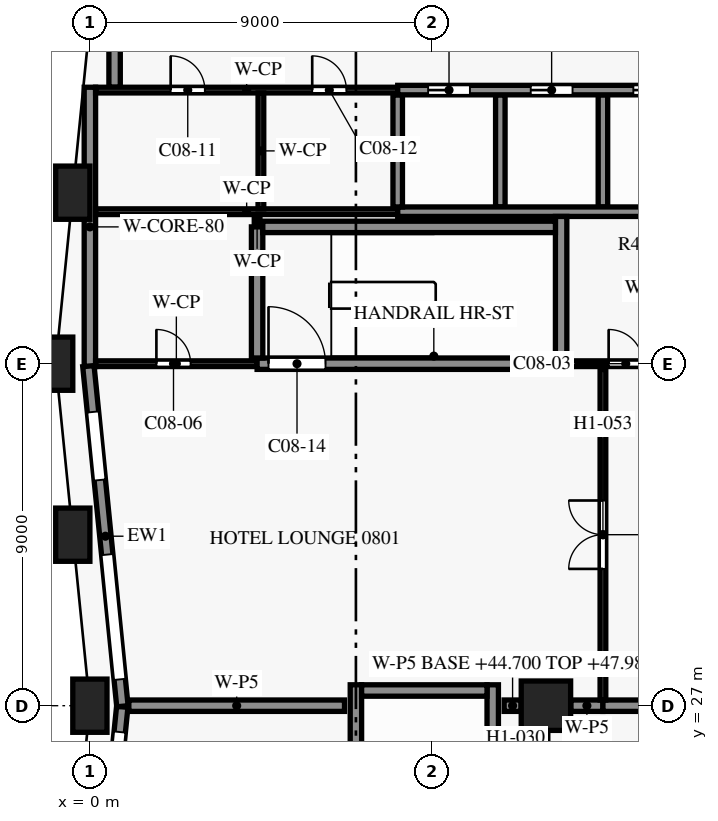
"""IFC4 building model, lengths in metres.
Left out: names, types, materials, properties, quantities, classifications, styles, units other than length and angle.
Written with IfcOpenShell. Run it as: python <this file> out.ifc"""

import sys

from ifc_helpers import new_model, si_unit, direction, frame, frame_2d, origin, origin_2d, place, context, subcontext, project, spatial, rectangle, extrude, element, fill, save


model = new_model("IFC4")
c1 = context("Model", 3, precision=1e-05, world=origin(), true_north=direction((0.0, 1.0)))
c2 = subcontext(c1, "Body", "Model", "MODEL_VIEW")
j1 = project(units=[si_unit("LENGTHUNIT", "METRE"), si_unit("PLANEANGLEUNIT", "RADIAN")], contexts=[c1])
p1 = place(None, origin())
s1 = spatial("IfcSite", under=j1, at=p1, CompositionType="ELEMENT")
p2 = place(p1, origin())
s2 = spatial("IfcBuilding", under=s1, at=p2, CompositionType="ELEMENT")
p3 = place(p2, frame((0.0, 0.0, 44.7)))
s3 = spatial("IfcBuildingStorey", under=s2, at=p3, CompositionType="ELEMENT", Elevation=44.7)
for number, where, z_axis, x_axis in (
    (1, (-0.45, 40.5, 0.0), (0.0, 0.0, 1.0), (-0.1, -0.995, 0.0)),
    (2, (-0.9, 36.0, 0.0), (0.0, 0.0, 1.0), (0.0, -1.0, 0.0)),
    (3, (-0.45, 31.5, 0.0), (0.0, 0.0, 1.0), (0.1, -0.995, 0.0)),
    (4, (0.0, 27.0, 0.0), (0.0, 0.0, 1.0), (0.0, -1.0, 0.0)),
):
    element("IfcColumn", number, at=place(p3, frame(where, z_axis=z_axis, x_axis=x_axis)), inside=s3, PredefinedType="COLUMN", context=c2, shape_type="SweptSolid", body=[
        extrude(rectangle(XDim=0.9, YDim=1.4, at=origin_2d()), origin(), (0.0, 0.0, 1.0), 3.6),
    ])
p4 = place(p3, frame((12.0, 27.0, 0.0), z_axis=(0.0, 0.0, 1.0), x_axis=(1.0, 0.0, 0.0)))
e5 = element("IfcColumn", 5, at=p4, inside=s3, PredefinedType="COLUMN", context=c2, shape_type="SweptSolid", body=[
    extrude(rectangle(XDim=1.3, YDim=1.3, at=origin_2d()), origin(), (0.0, 0.0, 1.0), 3.6),
])
p5 = place(p3, frame((0.856, 26.985, 0.0), z_axis=(0.0, 0.0, 1.0), x_axis=(-0.099503719021, 0.99503719021, 0.0)))
e6 = element("IfcWall", 6, at=p5, inside=s3, PredefinedType="SOLIDWALL", context=c2, shape_type="SweptSolid", body=[
    extrude(rectangle(XDim=8.995, YDim=0.3, at=frame_2d((4.498, 0.0))), origin(), (0.0, 0.0, 1.0), 2.95),
])
p6 = place(p5, frame((0.711, 0.0, 0.15)))
e7 = element("IfcOpeningElement", 7, at=p6, cuts=e6, PredefinedType="OPENING", context=c2, shape_type="SweptSolid", body=[
    extrude(rectangle(XDim=3.3, YDim=2.4, at=frame_2d((1.65, 1.2))), frame((0.0, 0.16, 0.0), z_axis=(0.0, -1.0, 0.0), x_axis=(1.0, 0.0, 0.0)), (0.0, 0.0, 1.0), 0.32),
])
p7 = place(p5, frame((5.984, 0.0, 0.75)))
e8 = element("IfcOpeningElement", 8, at=p7, cuts=e6, PredefinedType="OPENING", context=c2, shape_type="SweptSolid", body=[
    extrude(rectangle(XDim=1.8, YDim=1.8, at=frame_2d((0.9, 0.9))), frame((0.0, 0.16, 0.0), z_axis=(0.0, -1.0, 0.0), x_axis=(1.0, 0.0, 0.0)), (0.0, 0.0, 1.0), 0.32),
])
p8 = place(p3, frame((-0.047, 17.985, 0.0), z_axis=(0.0, 0.0, 1.0), x_axis=(0.099522457379, 0.995035316196, 0.0)))
e9 = element("IfcWall", 9, at=p8, inside=s3, PredefinedType="SOLIDWALL", context=c2, shape_type="SweptSolid", body=[
    extrude(rectangle(XDim=9.03, YDim=0.3, at=frame_2d((4.515, 0.0))), origin(), (0.0, 0.0, 1.0), 2.95),
])
p9 = place(p8, frame((1.291, 0.0, 0.75)))
e10 = element("IfcOpeningElement", 10, at=p9, cuts=e9, PredefinedType="OPENING", context=c2, shape_type="SweptSolid", body=[
    extrude(rectangle(XDim=1.8, YDim=1.8, at=frame_2d((0.9, 0.9))), frame((0.0, 0.16, 0.0), z_axis=(0.0, -1.0, 0.0), x_axis=(1.0, 0.0, 0.0)), (0.0, 0.0, 1.0), 0.32),
])
p10 = place(p8, frame((5.064, 0.0, 0.15)))
e11 = element("IfcOpeningElement", 11, at=p10, cuts=e9, PredefinedType="OPENING", context=c2, shape_type="SweptSolid", body=[
    extrude(rectangle(XDim=3.3, YDim=2.4, at=frame_2d((1.65, 1.2))), frame((0.0, 0.16, 0.0), z_axis=(0.0, -1.0, 0.0), x_axis=(1.0, 0.0, 0.0)), (0.0, 0.0, 1.0), 0.32),
])
p11 = place(p3, frame((7.15, 27.4, 0.0), z_axis=(0.0, 0.0, 1.0), x_axis=(1.0, 0.0, 0.0)))
e12 = element("IfcWall", 12, at=p11, inside=s3, PredefinedType="SHEAR", context=c2, shape_type="SweptSolid", body=[
    extrude(rectangle(XDim=3.3, YDim=0.3, at=frame_2d((1.65, 0.0))), origin(), (0.0, 0.0, 1.0), 3.3),
])
p12 = place(p3, frame((0.15, 36.0, 0.0), z_axis=(0.0, 0.0, 1.0), x_axis=(1.0, 0.0, 0.0)))
e13 = element("IfcWall", 13, at=p12, inside=s3, PredefinedType="PARTITIONING", context=c2, shape_type="SweptSolid", body=[
    extrude(rectangle(XDim=4.25, YDim=0.15, at=frame_2d((2.125, 0.0))), origin(), (0.0, 0.0, 1.0), 3.3),
])
p13 = place(p12, frame((1.6, 0.0, 0.0)))
e14 = element("IfcOpeningElement", 14, at=p13, cuts=e13, PredefinedType="OPENING", context=c2, shape_type="SweptSolid", body=[
    extrude(rectangle(XDim=0.9, YDim=2.1, at=frame_2d((0.45, 1.05))), frame((0.0, 0.085, 0.0), z_axis=(0.0, -1.0, 0.0), x_axis=(1.0, 0.0, 0.0)), (0.0, 0.0, 1.0), 0.17),
])
p14 = place(p3, frame((12.4, 36.0, 0.0), z_axis=(0.0, 0.0, 1.0), x_axis=(1.0, 0.0, 0.0)))
e15 = element("IfcWall", 15, at=p14, inside=s3, PredefinedType="SHEAR", context=c2, shape_type="SweptSolid", body=[
    extrude(rectangle(XDim=11.825, YDim=0.15, at=frame_2d((5.913, 0.0))), origin(), (0.0, 0.0, 1.0), 3.3),
])
p15 = place(p14, frame((1.25, 0.0, 0.0)))
e16 = element("IfcOpeningElement", 16, at=p15, cuts=e15, PredefinedType="OPENING", context=c2, shape_type="SweptSolid", body=[
    extrude(rectangle(XDim=0.9, YDim=2.1, at=frame_2d((0.45, 1.05))), frame((0.0, 0.085, 0.0), z_axis=(0.0, -1.0, 0.0), x_axis=(1.0, 0.0, 0.0)), (0.0, 0.0, 1.0), 0.17),
])
p16 = place(p14, frame((5.2, 0.0, 0.0)))
e17 = element("IfcOpeningElement", 17, at=p16, cuts=e15, PredefinedType="OPENING", context=c2, shape_type="SweptSolid", body=[
    extrude(rectangle(XDim=0.9, YDim=2.1, at=frame_2d((0.45, 1.05))), frame((0.0, 0.085, 0.0), z_axis=(0.0, -1.0, 0.0), x_axis=(1.0, 0.0, 0.0)), (0.0, 0.0, 1.0), 0.17),
])
p17 = place(p14, frame((9.425, 0.0, 0.0)))
e18 = element("IfcOpeningElement", 18, at=p17, cuts=e15, PredefinedType="OPENING", context=c2, shape_type="SweptSolid", body=[
    extrude(rectangle(XDim=0.95, YDim=2.1, at=frame_2d((0.475, 1.05))), frame((0.0, 0.085, 0.0), z_axis=(0.0, -1.0, 0.0), x_axis=(1.0, 0.0, 0.0)), (0.0, 0.0, 1.0), 0.17),
])
p18 = place(p3, frame((4.4, 36.0, 0.0), z_axis=(0.0, 0.0, 1.0), x_axis=(1.0, 0.0, 0.0)))
e19 = element("IfcWall", 19, at=p18, inside=s3, PredefinedType="SHEAR", context=c2, shape_type="SweptSolid", body=[
    extrude(rectangle(XDim=8.0, YDim=0.3, at=frame_2d((4.0, 0.0))), origin(), (0.0, 0.0, 1.0), 3.3),
])
p19 = place(p18, frame((0.3, 0.0, 0.0)))
e20 = element("IfcOpeningElement", 20, at=p19, cuts=e19, PredefinedType="OPENING", context=c2, shape_type="SweptSolid", body=[
    extrude(rectangle(XDim=1.5, YDim=2.2, at=frame_2d((0.75, 1.1))), frame((0.0, 0.16, 0.0), z_axis=(0.0, -1.0, 0.0), x_axis=(1.0, 0.0, 0.0)), (0.0, 0.0, 1.0), 0.32),
])
p20 = place(p3, frame((4.55, 39.6, 0.0), z_axis=(0.0, 0.0, 1.0), x_axis=(1.0, 0.0, 0.0)))
e21 = element("IfcWall", 21, at=p20, inside=s3, PredefinedType="SHEAR", context=c2, shape_type="SweptSolid", body=[
    extrude(rectangle(XDim=7.7, YDim=0.3, at=frame_2d((3.85, 0.0))), origin(), (0.0, 0.0, 1.0), 3.3),
])
p21 = place(p3, frame((0.15, 40.0, 0.0), z_axis=(0.0, 0.0, 1.0), x_axis=(1.0, 0.0, 0.0)))
e22 = element("IfcWall", 22, at=p21, inside=s3, PredefinedType="PARTITIONING", context=c2, shape_type="SweptSolid", body=[
    extrude(rectangle(XDim=7.95, YDim=0.15, at=frame_2d((3.975, 0.0))), origin(), (0.0, 0.0, 1.0), 3.3),
])
p22 = place(p3, frame((8.1, 40.0, 0.0), z_axis=(0.0, 0.0, 1.0), x_axis=(1.0, 0.0, 0.0)))
e23 = element("IfcWall", 23, at=p22, inside=s3, PredefinedType="SHEAR", context=c2, shape_type="SweptSolid", body=[
    extrude(rectangle(XDim=16.075, YDim=0.25, at=frame_2d((8.038, 0.0))), origin(), (0.0, 0.0, 1.0), 3.3),
])
p23 = place(p3, frame((0.15, 43.2, 0.0), z_axis=(0.0, 0.0, 1.0), x_axis=(1.0, 0.0, 0.0)))
e24 = element("IfcWall", 24, at=p23, inside=s3, PredefinedType="PARTITIONING", context=c2, shape_type="SweptSolid", body=[
    extrude(rectangle(XDim=7.95, YDim=0.15, at=frame_2d((3.975, 0.0))), origin(), (0.0, 0.0, 1.0), 3.3),
])
p24 = place(p23, frame((1.975, 0.0, 0.0)))
e25 = element("IfcOpeningElement", 25, at=p24, cuts=e24, PredefinedType="OPENING", context=c2, shape_type="SweptSolid", body=[
    extrude(rectangle(XDim=0.9, YDim=2.1, at=frame_2d((0.45, 1.05))), frame((0.0, 0.085, 0.0), z_axis=(0.0, -1.0, 0.0), x_axis=(1.0, 0.0, 0.0)), (0.0, 0.0, 1.0), 0.17),
])
p25 = place(p23, frame((5.7, 0.0, 0.0)))
e26 = element("IfcOpeningElement", 26, at=p25, cuts=e24, PredefinedType="OPENING", context=c2, shape_type="SweptSolid", body=[
    extrude(rectangle(XDim=0.9, YDim=2.1, at=frame_2d((0.45, 1.05))), frame((0.0, 0.085, 0.0), z_axis=(0.0, -1.0, 0.0), x_axis=(1.0, 0.0, 0.0)), (0.0, 0.0, 1.0), 0.17),
])
p26 = place(p3, frame((8.1, 43.2, 0.0), z_axis=(0.0, 0.0, 1.0), x_axis=(1.0, 0.0, 0.0)))
e27 = element("IfcWall", 27, at=p26, inside=s3, PredefinedType="SHEAR", context=c2, shape_type="SweptSolid", body=[
    extrude(rectangle(XDim=16.075, YDim=0.25, at=frame_2d((8.038, 0.0))), origin(), (0.0, 0.0, 1.0), 3.3),
])
p27 = place(p26, frame((14.3, 0.0, 0.0)))
e28 = element("IfcOpeningElement", 28, at=p27, cuts=e27, PredefinedType="OPENING", context=c2, shape_type="SweptSolid", body=[
    extrude(rectangle(XDim=1.1, YDim=2.1, at=frame_2d((0.55, 1.05))), frame((0.0, 0.135, 0.0), z_axis=(0.0, -1.0, 0.0), x_axis=(1.0, 0.0, 0.0)), (0.0, 0.0, 1.0), 0.27),
])
p28 = place(p26, frame((0.8, 0.0, 0.0)))
e29 = element("IfcOpeningElement", 29, at=p28, cuts=e27, PredefinedType="OPENING", context=c2, shape_type="SweptSolid", body=[
    extrude(rectangle(XDim=1.1, YDim=2.1, at=frame_2d((0.55, 1.05))), frame((0.0, 0.135, 0.0), z_axis=(0.0, -1.0, 0.0), x_axis=(1.0, 0.0, 0.0)), (0.0, 0.0, 1.0), 0.27),
])
p29 = place(p26, frame((3.5, 0.0, 0.0)))
e30 = element("IfcOpeningElement", 30, at=p29, cuts=e27, PredefinedType="OPENING", context=c2, shape_type="SweptSolid", body=[
    extrude(rectangle(XDim=1.1, YDim=2.1, at=frame_2d((0.55, 1.05))), frame((0.0, 0.135, 0.0), z_axis=(0.0, -1.0, 0.0), x_axis=(1.0, 0.0, 0.0)), (0.0, 0.0, 1.0), 0.27),
])
p30 = place(p26, frame((6.2, 0.0, 0.0)))
e31 = element("IfcOpeningElement", 31, at=p30, cuts=e27, PredefinedType="OPENING", context=c2, shape_type="SweptSolid", body=[
    extrude(rectangle(XDim=1.1, YDim=2.1, at=frame_2d((0.55, 1.05))), frame((0.0, 0.135, 0.0), z_axis=(0.0, -1.0, 0.0), x_axis=(1.0, 0.0, 0.0)), (0.0, 0.0, 1.0), 0.27),
])
p31 = place(p26, frame((8.9, 0.0, 0.0)))
e32 = element("IfcOpeningElement", 32, at=p31, cuts=e27, PredefinedType="OPENING", context=c2, shape_type="SweptSolid", body=[
    extrude(rectangle(XDim=1.1, YDim=2.1, at=frame_2d((0.55, 1.05))), frame((0.0, 0.135, 0.0), z_axis=(0.0, -1.0, 0.0), x_axis=(1.0, 0.0, 0.0)), (0.0, 0.0, 1.0), 0.27),
])
p32 = place(p26, frame((11.6, 0.0, 0.0)))
e33 = element("IfcOpeningElement", 33, at=p32, cuts=e27, PredefinedType="OPENING", context=c2, shape_type="SweptSolid", body=[
    extrude(rectangle(XDim=1.1, YDim=2.1, at=frame_2d((0.55, 1.05))), frame((0.0, 0.135, 0.0), z_axis=(0.0, -1.0, 0.0), x_axis=(1.0, 0.0, 0.0)), (0.0, 0.0, 1.0), 0.27),
])
p33 = place(p3, frame((0.0, 35.925, 0.0), z_axis=(0.0, 0.0, 1.0), x_axis=(0.0, 1.0, 0.0)))
e34 = element("IfcWall", 34, at=p33, inside=s3, PredefinedType="SHEAR", context=c2, shape_type="SweptSolid", body=[
    extrude(rectangle(XDim=7.35, YDim=0.3, at=frame_2d((3.675, 0.0))), origin(), (0.0, 0.0, 1.0), 3.3),
])
p34 = place(p3, frame((0.65, 43.275, 0.0), z_axis=(0.0, 0.0, 1.0), x_axis=(0.0, 1.0, 0.0)))
e35 = element("IfcWall", 35, at=p34, inside=s3, PredefinedType="SHEAR", context=c2, shape_type="SweptSolid", body=[
    extrude(rectangle(XDim=3.65, YDim=0.3, at=frame_2d((1.825, 0.0))), origin(), (0.0, 0.0, 1.0), 3.3),
])
p35 = place(p3, frame((4.4, 39.6, 0.0), z_axis=(0.0, 0.0, 1.0), x_axis=(0.0, 1.0, 0.0)))
e36 = element("IfcWall", 36, at=p35, inside=s3, PredefinedType="PARTITIONING", context=c2, shape_type="SweptSolid", body=[
    extrude(rectangle(XDim=0.325, YDim=0.15, at=frame_2d((0.163, 0.0))), origin(), (0.0, 0.0, 1.0), 3.3),
])
p36 = place(p3, frame((4.4, 36.15, 0.0), z_axis=(0.0, 0.0, 1.0), x_axis=(0.0, 1.0, 0.0)))
e37 = element("IfcWall", 37, at=p36, inside=s3, PredefinedType="SHEAR", context=c2, shape_type="SweptSolid", body=[
    extrude(rectangle(XDim=3.45, YDim=0.3, at=frame_2d((1.725, 0.0))), origin(), (0.0, 0.0, 1.0), 3.3),
])
p37 = place(p3, frame((4.5, 40.075, 0.0), z_axis=(0.0, 0.0, 1.0), x_axis=(0.0, 1.0, 0.0)))
e38 = element("IfcWall", 38, at=p37, inside=s3, PredefinedType="PARTITIONING", context=c2, shape_type="SweptSolid", body=[
    extrude(rectangle(XDim=3.05, YDim=0.15, at=frame_2d((1.525, 0.0))), origin(), (0.0, 0.0, 1.0), 3.3),
])
p38 = place(p3, frame((7.0, 19.25, 0.0), z_axis=(0.0, 0.0, 1.0), x_axis=(0.0, 1.0, 0.0)))
e39 = element("IfcWall", 39, at=p38, inside=s3, PredefinedType="SHEAR", context=c2, shape_type="SweptSolid", body=[
    extrude(rectangle(XDim=8.3, YDim=0.3, at=frame_2d((4.15, 0.0))), origin(), (0.0, 0.0, 1.0), 3.3),
])
p39 = place(p3, frame((8.1, 40.125, 0.0), z_axis=(0.0, 0.0, 1.0), x_axis=(0.0, 1.0, 0.0)))
e40 = element("IfcWall", 40, at=p39, inside=s3, PredefinedType="SHEAR", context=c2, shape_type="SweptSolid", body=[
    extrude(rectangle(XDim=2.95, YDim=0.25, at=frame_2d((1.475, 0.0))), origin(), (0.0, 0.0, 1.0), 3.3),
])
p40 = place(p3, frame((10.6, 19.25, 0.0), z_axis=(0.0, 0.0, 1.0), x_axis=(0.0, 1.0, 0.0)))
e41 = element("IfcWall", 41, at=p40, inside=s3, PredefinedType="SHEAR", context=c2, shape_type="SweptSolid", body=[
    extrude(rectangle(XDim=8.3, YDim=0.3, at=frame_2d((4.15, 0.0))), origin(), (0.0, 0.0, 1.0), 3.3),
])
p41 = place(p40, frame((0.55, 0.0, 0.0)))
e42 = element("IfcOpeningElement", 42, at=p41, cuts=e41, PredefinedType="OPENING", context=c2, shape_type="SweptSolid", body=[
    extrude(rectangle(XDim=1.2, YDim=2.2, at=frame_2d((0.6, 1.1))), frame((0.0, 0.16, 0.0), z_axis=(0.0, -1.0, 0.0), x_axis=(1.0, 0.0, 0.0)), (0.0, 0.0, 1.0), 0.32),
])
p42 = place(p3, frame((10.8, 40.125, 0.0), z_axis=(0.0, 0.0, 1.0), x_axis=(0.0, 1.0, 0.0)))
e43 = element("IfcWall", 43, at=p42, inside=s3, PredefinedType="SHEAR", context=c2, shape_type="SweptSolid", body=[
    extrude(rectangle(XDim=2.95, YDim=0.25, at=frame_2d((1.475, 0.0))), origin(), (0.0, 0.0, 1.0), 3.3),
])
p43 = place(p3, frame((12.4, 36.15, 0.0), z_axis=(0.0, 0.0, 1.0), x_axis=(0.0, 1.0, 0.0)))
e44 = element("IfcWall", 44, at=p43, inside=s3, PredefinedType="SHEAR", context=c2, shape_type="SweptSolid", body=[
    extrude(rectangle(XDim=3.725, YDim=0.3, at=frame_2d((1.863, 0.0))), origin(), (0.0, 0.0, 1.0), 3.3),
])
p44 = place(p3, frame((13.5, 40.125, 0.0), z_axis=(0.0, 0.0, 1.0), x_axis=(0.0, 1.0, 0.0)))
e45 = element("IfcWall", 45, at=p44, inside=s3, PredefinedType="SHEAR", context=c2, shape_type="SweptSolid", body=[
    extrude(rectangle(XDim=2.95, YDim=0.25, at=frame_2d((1.475, 0.0))), origin(), (0.0, 0.0, 1.0), 3.3),
])
p45 = place(p3, frame((12.0, 26.345, 0.0), z_axis=(0.0, 0.0, 1.0), x_axis=(0.0, -1.0, 0.0)))
e46 = element("IfcWall", 46, at=p45, inside=s3, PredefinedType="PARTITIONING", context=c2, shape_type="SweptSolid", body=[
    extrude(rectangle(XDim=3.845, YDim=0.1, at=frame_2d((1.922, 0.0))), origin(), (0.0, 0.0, 1.0), 2.58),
])
p46 = place(p45, frame((1.145, 0.0, 0.0)))
e47 = element("IfcOpeningElement", 47, at=p46, cuts=e46, PredefinedType="OPENING", context=c2, shape_type="SweptSolid", body=[
    extrude(rectangle(XDim=0.9, YDim=2.1, at=frame_2d((0.45, 1.05))), frame((0.0, 0.06, 0.0), z_axis=(0.0, -1.0, 0.0), x_axis=(1.0, 0.0, 0.0)), (0.0, 0.0, 1.0), 0.12),
])
p47 = place(p3, frame((6.7, 27.0, 0.0), z_axis=(0.0, 0.0, 1.0), x_axis=(-1.0, 0.0, 0.0)))
e48 = element("IfcWall", 48, at=p47, inside=s3, PredefinedType="PARTITIONING", context=c2, shape_type="SweptSolid", body=[
    extrude(rectangle(XDim=5.675, YDim=0.3, at=frame_2d((2.837, 0.0))), origin(), (0.0, 0.0, 1.0), 2.58),
])
p48 = place(p3, frame((11.345, 27.0, 0.0), z_axis=(0.0, 0.0, 1.0), x_axis=(-1.0, 0.0, 0.0)))
e49 = element("IfcWall", 49, at=p48, inside=s3, PredefinedType="PARTITIONING", context=c2, shape_type="SweptSolid", body=[
    extrude(rectangle(XDim=0.445, YDim=0.3, at=frame_2d((0.223, 0.0))), origin(), (0.0, 0.0, 1.0), 3.28),
])
p49 = place(p3, frame((13.5, 27.0, 0.0), z_axis=(0.0, 0.0, 1.0), x_axis=(-1.0, 0.0, 0.0)))
e50 = element("IfcWall", 50, at=p49, inside=s3, PredefinedType="PARTITIONING", context=c2, shape_type="SweptSolid", body=[
    extrude(rectangle(XDim=0.845, YDim=0.3, at=frame_2d((0.422, 0.0))), origin(), (0.0, 0.0, 1.0), 2.58),
])
p50 = place(p3, frame((23.345, 27.0, 0.0), z_axis=(0.0, 0.0, 1.0), x_axis=(-1.0, 0.0, 0.0)))
e51 = element("IfcWall", 51, at=p50, inside=s3, PredefinedType="PARTITIONING", context=c2, shape_type="SweptSolid", body=[
    extrude(rectangle(XDim=9.845, YDim=0.3, at=frame_2d((4.922, 0.0))), origin(), (0.0, 0.0, 1.0), 2.58),
])
p51 = place(p3, frame((13.5, 27.15, 0.0), z_axis=(0.0, 0.0, 1.0), x_axis=(0.0, 1.0, 0.0)))
e52 = element("IfcWall", 52, at=p51, inside=s3, PredefinedType="PARTITIONING", context=c2, shape_type="SweptSolid", body=[
    extrude(rectangle(XDim=8.7, YDim=0.15, at=frame_2d((4.35, 0.0))), origin(), (0.0, 0.0, 1.0), 3.28),
])
p52 = place(p51, frame((3.45, 0.0, 0.0)))
e53 = element("IfcOpeningElement", 53, at=p52, cuts=e52, PredefinedType="OPENING", context=c2, shape_type="SweptSolid", body=[
    extrude(rectangle(XDim=1.8, YDim=2.1, at=frame_2d((0.9, 1.05))), frame((0.0, 0.085, 0.0), z_axis=(0.0, -1.0, 0.0), x_axis=(1.0, 0.0, 0.0)), (0.0, 0.0, 1.0), 0.17),
])
p53 = place(p6, origin())
e54 = element("IfcWindow", 54, at=p53, inside=s3, PartitioningType="SINGLE_PANEL", PredefinedType="WINDOW", context=c2, shape_type="SweptSolid", body=[
    extrude(rectangle(XDim=3.3, YDim=2.4, at=frame_2d((1.65, 1.2))), frame((0.0, 0.03, 0.0), z_axis=(0.0, -1.0, 0.0), x_axis=(1.0, 0.0, 0.0)), (0.0, 0.0, 1.0), 0.06),
])
fill(e7, e54)
p54 = place(p7, origin())
e55 = element("IfcWindow", 55, at=p54, inside=s3, PartitioningType="SINGLE_PANEL", PredefinedType="WINDOW", context=c2, shape_type="SweptSolid", body=[
    extrude(rectangle(XDim=1.8, YDim=1.8, at=frame_2d((0.9, 0.9))), frame((0.0, 0.03, 0.0), z_axis=(0.0, -1.0, 0.0), x_axis=(1.0, 0.0, 0.0)), (0.0, 0.0, 1.0), 0.06),
])
fill(e8, e55)
p55 = place(p10, origin())
e56 = element("IfcWindow", 56, at=p55, inside=s3, PartitioningType="SINGLE_PANEL", PredefinedType="WINDOW", context=c2, shape_type="SweptSolid", body=[
    extrude(rectangle(XDim=3.3, YDim=2.4, at=frame_2d((1.65, 1.2))), frame((0.0, 0.03, 0.0), z_axis=(0.0, -1.0, 0.0), x_axis=(1.0, 0.0, 0.0)), (0.0, 0.0, 1.0), 0.06),
])
fill(e11, e56)
p56 = place(p15, origin())
e57 = element("IfcDoor", 57, at=p56, inside=s3, OperationType="SINGLE_SWING_RIGHT", PredefinedType="DOOR", context=c2, shape_type="SweptSolid", body=[
    extrude(rectangle(XDim=0.9, YDim=2.1, at=frame_2d((0.45, 1.05))), frame((0.0, 0.025, 0.0), z_axis=(0.0, -1.0, 0.0), x_axis=(1.0, 0.0, 0.0)), (0.0, 0.0, 1.0), 0.05),
])
fill(e16, e57)
p57 = place(p13, origin())
e58 = element("IfcDoor", 58, at=p57, inside=s3, OperationType="SINGLE_SWING_LEFT", PredefinedType="DOOR", context=c2, shape_type="SweptSolid", body=[
    extrude(rectangle(XDim=0.9, YDim=2.1, at=frame_2d((0.45, 1.05))), frame((0.0, 0.025, 0.0), z_axis=(0.0, -1.0, 0.0), x_axis=(1.0, 0.0, 0.0)), (0.0, 0.0, 1.0), 0.05),
])
fill(e14, e58)
p58 = place(p24, origin())
e59 = element("IfcDoor", 59, at=p58, inside=s3, OperationType="SINGLE_SWING_LEFT", PredefinedType="DOOR", context=c2, shape_type="SweptSolid", body=[
    extrude(rectangle(XDim=0.9, YDim=2.1, at=frame_2d((0.45, 1.05))), frame((0.0, 0.025, 0.0), z_axis=(0.0, -1.0, 0.0), x_axis=(1.0, 0.0, 0.0)), (0.0, 0.0, 1.0), 0.05),
])
fill(e25, e59)
p59 = place(p25, origin())
e60 = element("IfcDoor", 60, at=p59, inside=s3, OperationType="SINGLE_SWING_RIGHT", PredefinedType="DOOR", context=c2, shape_type="SweptSolid", body=[
    extrude(rectangle(XDim=0.9, YDim=2.1, at=frame_2d((0.45, 1.05))), frame((0.0, 0.025, 0.0), z_axis=(0.0, -1.0, 0.0), x_axis=(1.0, 0.0, 0.0)), (0.0, 0.0, 1.0), 0.05),
])
fill(e26, e60)
p60 = place(p19, origin())
e61 = element("IfcDoor", 61, at=p60, inside=s3, OperationType="SINGLE_SWING_RIGHT", PredefinedType="DOOR", context=c2, shape_type="SweptSolid", body=[
    extrude(rectangle(XDim=1.5, YDim=2.2, at=frame_2d((0.75, 1.1))), frame((0.0, 0.025, 0.0), z_axis=(0.0, -1.0, 0.0), x_axis=(1.0, 0.0, 0.0)), (0.0, 0.0, 1.0), 0.05),
])
fill(e20, e61)
p61 = place(p28, origin())
e62 = element("IfcDoor", 62, at=p61, inside=s3, OperationType="DOUBLE_DOOR_SLIDING", PredefinedType="DOOR", context=c2, shape_type="SweptSolid", body=[
    extrude(rectangle(XDim=1.1, YDim=2.1, at=frame_2d((0.55, 1.05))), frame((0.0, 0.025, 0.0), z_axis=(0.0, -1.0, 0.0), x_axis=(1.0, 0.0, 0.0)), (0.0, 0.0, 1.0), 0.05),
])
fill(e29, e62)
p62 = place(p29, origin())
e63 = element("IfcDoor", 63, at=p62, inside=s3, OperationType="DOUBLE_DOOR_SLIDING", PredefinedType="DOOR", context=c2, shape_type="SweptSolid", body=[
    extrude(rectangle(XDim=1.1, YDim=2.1, at=frame_2d((0.55, 1.05))), frame((0.0, 0.025, 0.0), z_axis=(0.0, -1.0, 0.0), x_axis=(1.0, 0.0, 0.0)), (0.0, 0.0, 1.0), 0.05),
])
fill(e30, e63)
p63 = place(p30, origin())
e64 = element("IfcDoor", 64, at=p63, inside=s3, OperationType="DOUBLE_DOOR_SLIDING", PredefinedType="DOOR", context=c2, shape_type="SweptSolid", body=[
    extrude(rectangle(XDim=1.1, YDim=2.1, at=frame_2d((0.55, 1.05))), frame((0.0, 0.025, 0.0), z_axis=(0.0, -1.0, 0.0), x_axis=(1.0, 0.0, 0.0)), (0.0, 0.0, 1.0), 0.05),
])
fill(e31, e64)
p64 = place(p52, origin())
e65 = element("IfcDoor", 65, at=p64, inside=s3, OperationType="DOUBLE_DOOR_SINGLE_SWING", PredefinedType="DOOR", context=c2, shape_type="SweptSolid", body=[
    extrude(rectangle(XDim=1.8, YDim=2.1, at=frame_2d((0.9, 1.05))), frame((0.0, 0.025, 0.0), z_axis=(0.0, -1.0, 0.0), x_axis=(1.0, 0.0, 0.0)), (0.0, 0.0, 1.0), 0.05),
])
fill(e53, e65)
save(model, sys.argv[1])
